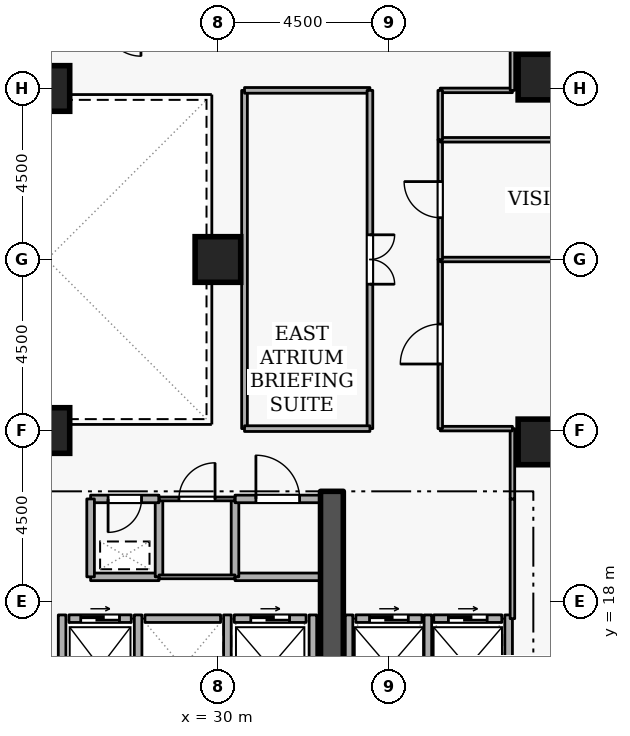
"""IFC4 building model, lengths in metres.
Left out: names, types, materials, properties, quantities, classifications, styles, units other than length and angle.
Written with IfcOpenShell. Run it as: python <this file> out.ifc"""

import sys

from ifc_helpers import new_model, si_unit, direction, frame, frame_2d, origin, origin_2d, place, context, subcontext, project, spatial, rectangle, extrude, element, fill, save


model = new_model("IFC4")
c1 = context("Model", 3, precision=1e-05, world=origin(), true_north=direction((0.0, 1.0)))
c2 = subcontext(c1, "Body", "Model", "MODEL_VIEW")
j1 = project(units=[si_unit("LENGTHUNIT", "METRE"), si_unit("PLANEANGLEUNIT", "RADIAN")], contexts=[c1])
p1 = place(None, origin())
s1 = spatial("IfcSite", under=j1, at=p1, CompositionType="ELEMENT")
p2 = place(p1, origin())
s2 = spatial("IfcBuilding", under=s1, at=p2, CompositionType="ELEMENT")
p3 = place(p2, frame((0.0, 0.0, 90.9)))
s3 = spatial("IfcBuildingStorey", under=s2, at=p3, CompositionType="ELEMENT", Elevation=90.9)
p4 = place(p3, frame((33.0, 15.2, 0.0), z_axis=(0.0, 0.0, 1.0), x_axis=(0.0, 1.0, 0.0)))
e1 = element("IfcWall", 1, at=p4, inside=s3, PredefinedType="SHEAR", context=c2, shape_type="SweptSolid", body=[
    extrude(rectangle(XDim=5.7, YDim=0.6, at=frame_2d((2.85, 0.0))), origin(), (0.0, 0.0, 1.0), 3.6),
])
for number, where, z_axis, x_axis in (
    (2, (38.5, 22.2, 0.0), (0.0, 0.0, 1.0), (1.0, 0.0, 0.0)),
    (3, (38.5, 31.8, 0.0), (0.0, 0.0, 1.0), (1.0, 0.0, 0.0)),
    (4, (25.5, 22.5, 0.0), (0.0, 0.0, 1.0), (1.0, 0.0, 0.0)),
    (5, (25.5, 31.5, 0.0), (0.0, 0.0, 1.0), (1.0, 0.0, 0.0)),
    (6, (30.0, 27.0, 0.0), (0.0, 0.0, 1.0), (1.0, 0.0, 0.0)),
):
    element("IfcColumn", number, at=place(p3, frame(where, z_axis=z_axis, x_axis=x_axis)), inside=s3, PredefinedType="COLUMN", context=c2, shape_type="SweptSolid", body=[
        extrude(rectangle(XDim=1.2, YDim=1.2, at=origin_2d()), origin(), (0.0, 0.0, 1.0), 3.6),
    ])
p5 = place(p3, frame((26.08, 17.55, 0.0), z_axis=(0.0, 0.0, 1.0), x_axis=(1.0, 0.0, 0.0)))
e7 = element("IfcWall", 7, at=p5, inside=s3, PredefinedType="STANDARD", context=c2, shape_type="SweptSolid", body=[
    extrude(rectangle(XDim=1.64, YDim=0.2, at=frame_2d((0.82, 0.0))), origin(), (0.0, 0.0, 1.0), 3.34),
])
p6 = place(p5, frame((0.31, 0.0, 0.0)))
e8 = element("IfcOpeningElement", 8, at=p6, cuts=e7, PredefinedType="OPENING", context=c2, shape_type="SweptSolid", body=[
    extrude(rectangle(XDim=1.02, YDim=2.06, at=frame_2d((0.51, 1.03))), frame((0.0, 0.11, 0.0), z_axis=(0.0, -1.0, 0.0), x_axis=(1.0, 0.0, 0.0)), (0.0, 0.0, 1.0), 0.22),
])
p7 = place(p3, frame((28.08, 17.55, 0.0), z_axis=(0.0, 0.0, 1.0), x_axis=(1.0, 0.0, 0.0)))
e9 = element("IfcWall", 9, at=p7, inside=s3, PredefinedType="STANDARD", context=c2, shape_type="SweptSolid", body=[
    extrude(rectangle(XDim=1.99, YDim=0.2, at=frame_2d((0.995, 0.0))), origin(), (0.0, 0.0, 1.0), 3.34),
])
p8 = place(p3, frame((30.43, 17.55, 0.0), z_axis=(0.0, 0.0, 1.0), x_axis=(1.0, 0.0, 0.0)))
e10 = element("IfcWall", 10, at=p8, inside=s3, PredefinedType="STANDARD", context=c2, shape_type="SweptSolid", body=[
    extrude(rectangle(XDim=1.89, YDim=0.2, at=frame_2d((0.945, 0.0))), origin(), (0.0, 0.0, 1.0), 3.34),
])
p9 = place(p8, frame((0.435, 0.0, 0.0)))
e11 = element("IfcOpeningElement", 11, at=p9, cuts=e10, PredefinedType="OPENING", context=c2, shape_type="SweptSolid", body=[
    extrude(rectangle(XDim=1.02, YDim=2.06, at=frame_2d((0.51, 1.03))), frame((0.0, 0.11, 0.0), z_axis=(0.0, -1.0, 0.0), x_axis=(1.0, 0.0, 0.0)), (0.0, 0.0, 1.0), 0.22),
])
p10 = place(p3, frame((33.63, 17.55, 0.0), z_axis=(0.0, 0.0, 1.0), x_axis=(1.0, 0.0, 0.0)))
e12 = element("IfcWall", 12, at=p10, inside=s3, PredefinedType="STANDARD", context=c2, shape_type="SweptSolid", body=[
    extrude(rectangle(XDim=1.74, YDim=0.2, at=frame_2d((0.87, 0.0))), origin(), (0.0, 0.0, 1.0), 3.34),
])
p11 = place(p10, frame((0.36, 0.0, 0.0)))
e13 = element("IfcOpeningElement", 13, at=p11, cuts=e12, PredefinedType="OPENING", context=c2, shape_type="SweptSolid", body=[
    extrude(rectangle(XDim=1.02, YDim=2.06, at=frame_2d((0.51, 1.03))), frame((0.0, 0.11, 0.0), z_axis=(0.0, -1.0, 0.0), x_axis=(1.0, 0.0, 0.0)), (0.0, 0.0, 1.0), 0.22),
])
p12 = place(p3, frame((35.68, 17.55, 0.0), z_axis=(0.0, 0.0, 1.0), x_axis=(1.0, 0.0, 0.0)))
e14 = element("IfcWall", 14, at=p12, inside=s3, PredefinedType="STANDARD", context=c2, shape_type="SweptSolid", body=[
    extrude(rectangle(XDim=1.79, YDim=0.2, at=frame_2d((0.895, 0.0))), origin(), (0.0, 0.0, 1.0), 3.34),
])
p13 = place(p12, frame((0.385, 0.0, 0.0)))
e15 = element("IfcOpeningElement", 15, at=p13, cuts=e14, PredefinedType="OPENING", context=c2, shape_type="SweptSolid", body=[
    extrude(rectangle(XDim=1.02, YDim=2.06, at=frame_2d((0.51, 1.03))), frame((0.0, 0.11, 0.0), z_axis=(0.0, -1.0, 0.0), x_axis=(1.0, 0.0, 0.0)), (0.0, 0.0, 1.0), 0.22),
])
for number, where, z_axis, x_axis in (
    (16, (27.9, 15.212, 0.0), (0.0, 0.0, 1.0), (0.0, 1.0, 0.0)),
    (17, (25.9, 15.212, 0.0), (0.0, 0.0, 1.0), (0.0, 1.0, 0.0)),
    (18, (30.25, 15.212, 0.0), (0.0, 0.0, 1.0), (0.0, 1.0, 0.0)),
    (19, (32.5, 15.212, 0.0), (0.0, 0.0, 1.0), (0.0, 1.0, 0.0)),
):
    element("IfcWall", number, at=place(p3, frame(where, z_axis=z_axis, x_axis=x_axis)), inside=s3, PredefinedType="STANDARD", context=c2, shape_type="SweptSolid", body=[
        extrude(rectangle(XDim=2.436, YDim=0.2, at=frame_2d((1.218, 0.0))), origin(), (0.0, 0.0, 1.0), 3.34),
    ])
for number, where, z_axis, x_axis in (
    (20, (35.525, 15.012, 0.0), (0.0, 0.0, 1.0), (0.0, 1.0, 0.0)),
    (21, (33.45, 15.012, 0.0), (0.0, 0.0, 1.0), (0.0, 1.0, 0.0)),
    (22, (37.65, 15.012, 0.0), (0.0, 0.0, 1.0), (0.0, 1.0, 0.0)),
):
    element("IfcWall", number, at=place(p3, frame(where, z_axis=z_axis, x_axis=x_axis)), inside=s3, PredefinedType="STANDARD", context=c2, shape_type="SweptSolid", body=[
        extrude(rectangle(XDim=2.636, YDim=0.2, at=frame_2d((1.318, 0.0))), origin(), (0.0, 0.0, 1.0), 3.34),
    ])
p14 = place(p3, frame((26.65, 18.65, 0.0), z_axis=(0.0, 0.0, 1.0), x_axis=(1.0, 0.0, 0.0)))
e23 = element("IfcWall", 23, at=p14, inside=s3, PredefinedType="STANDARD", context=c2, shape_type="SweptSolid", body=[
    extrude(rectangle(XDim=1.8, YDim=0.2, at=frame_2d((0.9, 0.0))), origin(), (0.0, 0.0, 1.0), 3.34),
])
p15 = place(p3, frame((28.45, 18.65, 0.0), z_axis=(0.0, 0.0, 1.0), x_axis=(0.0, 1.0, 0.0)))
e24 = element("IfcWall", 24, at=p15, inside=s3, PredefinedType="STANDARD", context=c2, shape_type="SweptSolid", body=[
    extrude(rectangle(XDim=2.05, YDim=0.2, at=frame_2d((1.025, 0.0))), origin(), (0.0, 0.0, 1.0), 3.34),
])
p16 = place(p3, frame((28.45, 20.7, 0.0), z_axis=(0.0, 0.0, 1.0), x_axis=(-1.0, 0.0, 0.0)))
e25 = element("IfcWall", 25, at=p16, inside=s3, PredefinedType="STANDARD", context=c2, shape_type="SweptSolid", body=[
    extrude(rectangle(XDim=1.8, YDim=0.2, at=frame_2d((0.9, 0.0))), origin(), (0.0, 0.0, 1.0), 3.34),
])
p17 = place(p16, frame((0.46, 0.0, 0.0)))
e26 = element("IfcOpeningElement", 26, at=p17, cuts=e25, PredefinedType="OPENING", context=c2, shape_type="SweptSolid", body=[
    extrude(rectangle(XDim=0.88, YDim=2.04, at=frame_2d((0.44, 1.02))), frame((0.0, 0.11, 0.0), z_axis=(0.0, -1.0, 0.0), x_axis=(1.0, 0.0, 0.0)), (0.0, 0.0, 1.0), 0.22),
])
p18 = place(p3, frame((26.65, 20.7, 0.0), z_axis=(0.0, 0.0, 1.0), x_axis=(0.0, -1.0, 0.0)))
e27 = element("IfcWall", 27, at=p18, inside=s3, PredefinedType="STANDARD", context=c2, shape_type="SweptSolid", body=[
    extrude(rectangle(XDim=2.05, YDim=0.2, at=frame_2d((1.025, 0.0))), origin(), (0.0, 0.0, 1.0), 3.34),
])
p19 = place(p3, frame((32.7, 18.65, 0.0), z_axis=(0.0, 0.0, 1.0), x_axis=(-1.0, 0.0, 0.0)))
e28 = element("IfcWall", 28, at=p19, inside=s3, PredefinedType="STANDARD", context=c2, shape_type="SweptSolid", body=[
    extrude(rectangle(XDim=2.25, YDim=0.2, at=frame_2d((1.125, 0.0))), origin(), (0.0, 0.0, 1.0), 3.34),
])
p20 = place(p3, frame((30.45, 18.65, 0.0), z_axis=(0.0, 0.0, 1.0), x_axis=(0.0, 1.0, 0.0)))
e29 = element("IfcWall", 29, at=p20, inside=s3, PredefinedType="STANDARD", context=c2, shape_type="SweptSolid", body=[
    extrude(rectangle(XDim=2.05, YDim=0.2, at=frame_2d((1.025, 0.0))), origin(), (0.0, 0.0, 1.0), 3.34),
])
p21 = place(p3, frame((30.45, 20.7, 0.0), z_axis=(0.0, 0.0, 1.0), x_axis=(1.0, 0.0, 0.0)))
e30 = element("IfcWall", 30, at=p21, inside=s3, PredefinedType="STANDARD", context=c2, shape_type="SweptSolid", body=[
    extrude(rectangle(XDim=2.25, YDim=0.2, at=frame_2d((1.125, 0.0))), origin(), (0.0, 0.0, 1.0), 3.34),
])
p22 = place(p21, frame((0.55, 0.0, 0.0)))
e31 = element("IfcOpeningElement", 31, at=p22, cuts=e30, PredefinedType="OPENING", context=c2, shape_type="SweptSolid", body=[
    extrude(rectangle(XDim=1.15, YDim=2.1, at=frame_2d((0.575, 1.05))), frame((0.0, 0.11, 0.0), z_axis=(0.0, -1.0, 0.0), x_axis=(1.0, 0.0, 0.0)), (0.0, 0.0, 1.0), 0.22),
])
p23 = place(p3, frame((30.45, 18.65, 0.0), z_axis=(0.0, 0.0, 1.0), x_axis=(-1.0, 0.0, 0.0)))
e32 = element("IfcWall", 32, at=p23, inside=s3, PredefinedType="PARTITIONING", context=c2, shape_type="SweptSolid", body=[
    extrude(rectangle(XDim=2.0, YDim=0.1, at=frame_2d((1.0, 0.0))), origin(), (0.0, 0.0, 1.0), 3.34),
])
p24 = place(p3, frame((28.45, 20.7, 0.0), z_axis=(0.0, 0.0, 1.0), x_axis=(1.0, 0.0, 0.0)))
e33 = element("IfcWall", 33, at=p24, inside=s3, PredefinedType="PARTITIONING", context=c2, shape_type="SweptSolid", body=[
    extrude(rectangle(XDim=2.0, YDim=0.1, at=frame_2d((1.0, 0.0))), origin(), (0.0, 0.0, 1.0), 3.34),
])
p25 = place(p24, frame((0.525, 0.0, 0.0)))
e34 = element("IfcOpeningElement", 34, at=p25, cuts=e33, PredefinedType="OPENING", context=c2, shape_type="SweptSolid", body=[
    extrude(rectangle(XDim=0.95, YDim=2.1, at=frame_2d((0.475, 1.05))), frame((0.0, 0.06, 0.0), z_axis=(0.0, -1.0, 0.0), x_axis=(1.0, 0.0, 0.0)), (0.0, 0.0, 1.0), 0.12),
])
p26 = place(p3, frame((37.75, 17.55, 0.0), z_axis=(0.0, 0.0, 1.0), x_axis=(0.0, 1.0, 0.0)))
e35 = element("IfcWall", 35, at=p26, inside=s3, PredefinedType="PARTITIONING", context=c2, shape_type="SweptSolid", body=[
    extrude(rectangle(XDim=3.15, YDim=0.12, at=frame_2d((1.575, 0.0))), origin(), (0.0, 0.0, 1.0), 3.34),
])
p27 = place(p3, frame((37.75, 20.7, 0.0), z_axis=(0.0, 0.0, 1.0), x_axis=(0.0, 1.0, 0.0)))
e36 = element("IfcWall", 36, at=p27, inside=s3, PredefinedType="PARTITIONING", context=c2, shape_type="SweptSolid", body=[
    extrude(rectangle(XDim=1.85, YDim=0.12, at=frame_2d((0.925, 0.0))), origin(), (0.0, 0.0, 1.0), 3.34),
])
p28 = place(p3, frame((37.75, 22.55, 0.0), z_axis=(0.0, 0.0, 1.0), x_axis=(-1.0, 0.0, 0.0)))
e37 = element("IfcWall", 37, at=p28, inside=s3, PredefinedType="PARTITIONING", context=c2, shape_type="SweptSolid", body=[
    extrude(rectangle(XDim=1.9, YDim=0.12, at=frame_2d((0.95, 0.0))), origin(), (0.0, 0.0, 1.0), 3.34),
])
p29 = place(p3, frame((35.85, 22.55, 0.0), z_axis=(0.0, 0.0, 1.0), x_axis=(0.0, 1.0, 0.0)))
e38 = element("IfcWall", 38, at=p29, inside=s3, PredefinedType="PARTITIONING", context=c2, shape_type="SweptSolid", body=[
    extrude(rectangle(XDim=4.45, YDim=0.12, at=frame_2d((2.225, 0.0))), origin(), (0.0, 0.0, 1.0), 3.34),
])
p30 = place(p29, frame((1.7, 0.0, 0.0)))
e39 = element("IfcOpeningElement", 39, at=p30, cuts=e38, PredefinedType="OPENING", context=c2, shape_type="SweptSolid", body=[
    extrude(rectangle(XDim=1.05, YDim=2.1, at=frame_2d((0.525, 1.05))), frame((0.0, 0.07, 0.0), z_axis=(0.0, -1.0, 0.0), x_axis=(1.0, 0.0, 0.0)), (0.0, 0.0, 1.0), 0.14),
])
p31 = place(p3, frame((35.85, 27.0, 0.0), z_axis=(0.0, 0.0, 1.0), x_axis=(1.0, 0.0, 0.0)))
e40 = element("IfcWall", 40, at=p31, inside=s3, PredefinedType="PARTITIONING", context=c2, shape_type="SweptSolid", body=[
    extrude(rectangle(XDim=13.57, YDim=0.12, at=frame_2d((6.785, 0.0))), origin(), (0.0, 0.0, 1.0), 2.932),
])
p32 = place(p3, frame((35.85, 27.0, 0.0), z_axis=(0.0, 0.0, 1.0), x_axis=(0.0, 1.0, 0.0)))
e41 = element("IfcWall", 41, at=p32, inside=s3, PredefinedType="PARTITIONING", context=c2, shape_type="SweptSolid", body=[
    extrude(rectangle(XDim=3.15, YDim=0.12, at=frame_2d((1.575, 0.0))), origin(), (0.0, 0.0, 1.0), 3.34),
])
p33 = place(p32, frame((1.1, 0.0, 0.0)))
e42 = element("IfcOpeningElement", 42, at=p33, cuts=e41, PredefinedType="OPENING", context=c2, shape_type="SweptSolid", body=[
    extrude(rectangle(XDim=0.95, YDim=2.1, at=frame_2d((0.475, 1.05))), frame((0.0, 0.07, 0.0), z_axis=(0.0, -1.0, 0.0), x_axis=(1.0, 0.0, 0.0)), (0.0, 0.0, 1.0), 0.14),
])
p34 = place(p3, frame((35.85, 30.15, 0.0), z_axis=(0.0, 0.0, 1.0), x_axis=(1.0, 0.0, 0.0)))
e43 = element("IfcWall", 43, at=p34, inside=s3, PredefinedType="PARTITIONING", context=c2, shape_type="SweptSolid", body=[
    extrude(rectangle(XDim=13.57, YDim=0.12, at=frame_2d((6.785, 0.0))), origin(), (0.0, 0.0, 1.0), 3.34),
])
p35 = place(p3, frame((35.85, 31.45, 0.0), z_axis=(0.0, 0.0, 1.0), x_axis=(1.0, 0.0, 0.0)))
e44 = element("IfcWall", 44, at=p35, inside=s3, PredefinedType="PARTITIONING", context=c2, shape_type="SweptSolid", body=[
    extrude(rectangle(XDim=1.9, YDim=0.12, at=frame_2d((0.95, 0.0))), origin(), (0.0, 0.0, 1.0), 3.34),
])
p36 = place(p3, frame((37.75, 31.45, 0.0), z_axis=(0.0, 0.0, 1.0), x_axis=(0.0, 1.0, 0.0)))
e45 = element("IfcWall", 45, at=p36, inside=s3, PredefinedType="PARTITIONING", context=c2, shape_type="SweptSolid", body=[
    extrude(rectangle(XDim=1.85, YDim=0.12, at=frame_2d((0.925, 0.0))), origin(), (0.0, 0.0, 1.0), 3.34),
])
p37 = place(p3, frame((35.85, 30.15, 0.0), z_axis=(0.0, 0.0, 1.0), x_axis=(0.0, 1.0, 0.0)))
e46 = element("IfcWall", 46, at=p37, inside=s3, PredefinedType="PARTITIONING", context=c2, shape_type="SweptSolid", body=[
    extrude(rectangle(XDim=1.3, YDim=0.12, at=frame_2d((0.65, 0.0))), origin(), (0.0, 0.0, 1.0), 3.34),
])
p38 = place(p3, frame((30.7, 22.55, 0.0), z_axis=(0.0, 0.0, 1.0), x_axis=(0.0, 1.0, 0.0)))
e47 = element("IfcWall", 47, at=p38, inside=s3, PredefinedType="PARTITIONING", context=c2, shape_type="SweptSolid", body=[
    extrude(rectangle(XDim=8.9, YDim=0.15, at=frame_2d((4.45, 0.0))), origin(), (0.0, 0.0, 1.0), 3.34),
])
p39 = place(p3, frame((30.7, 31.45, 0.0), z_axis=(0.0, 0.0, 1.0), x_axis=(1.0, 0.0, 0.0)))
e48 = element("IfcWall", 48, at=p39, inside=s3, PredefinedType="PARTITIONING", context=c2, shape_type="SweptSolid", body=[
    extrude(rectangle(XDim=3.3, YDim=0.15, at=frame_2d((1.65, 0.0))), origin(), (0.0, 0.0, 1.0), 3.34),
])
p40 = place(p3, frame((34.0, 31.45, 0.0), z_axis=(0.0, 0.0, 1.0), x_axis=(0.0, -1.0, 0.0)))
e49 = element("IfcWall", 49, at=p40, inside=s3, PredefinedType="PARTITIONING", context=c2, shape_type="SweptSolid", body=[
    extrude(rectangle(XDim=8.9, YDim=0.15, at=frame_2d((4.45, 0.0))), origin(), (0.0, 0.0, 1.0), 3.34),
])
p41 = place(p40, frame((3.8, 0.0, 0.0)))
e50 = element("IfcOpeningElement", 50, at=p41, cuts=e49, PredefinedType="OPENING", context=c2, shape_type="SweptSolid", body=[
    extrude(rectangle(XDim=1.3, YDim=2.12, at=frame_2d((0.65, 1.06))), frame((0.0, 0.085, 0.0), z_axis=(0.0, -1.0, 0.0), x_axis=(1.0, 0.0, 0.0)), (0.0, 0.0, 1.0), 0.17),
])
p42 = place(p3, frame((34.0, 22.55, 0.0), z_axis=(0.0, 0.0, 1.0), x_axis=(-1.0, 0.0, 0.0)))
e51 = element("IfcWall", 51, at=p42, inside=s3, PredefinedType="PARTITIONING", context=c2, shape_type="SweptSolid", body=[
    extrude(rectangle(XDim=3.3, YDim=0.15, at=frame_2d((1.65, 0.0))), origin(), (0.0, 0.0, 1.0), 3.34),
])
p43 = place(p6, origin())
e52 = element("IfcDoor", 52, at=p43, inside=s3, OperationType="SLIDING_TO_LEFT", PredefinedType="DOOR", context=c2, shape_type="SweptSolid", body=[
    extrude(rectangle(XDim=1.02, YDim=2.06, at=frame_2d((0.51, 1.03))), frame((0.0, 0.025, 0.0), z_axis=(0.0, -1.0, 0.0), x_axis=(1.0, 0.0, 0.0)), (0.0, 0.0, 1.0), 0.05),
])
fill(e8, e52)
p44 = place(p9, origin())
e53 = element("IfcDoor", 53, at=p44, inside=s3, OperationType="SLIDING_TO_LEFT", PredefinedType="DOOR", context=c2, shape_type="SweptSolid", body=[
    extrude(rectangle(XDim=1.02, YDim=2.06, at=frame_2d((0.51, 1.03))), frame((0.0, 0.025, 0.0), z_axis=(0.0, -1.0, 0.0), x_axis=(1.0, 0.0, 0.0)), (0.0, 0.0, 1.0), 0.05),
])
fill(e11, e53)
p45 = place(p11, origin())
e54 = element("IfcDoor", 54, at=p45, inside=s3, OperationType="SLIDING_TO_LEFT", PredefinedType="DOOR", context=c2, shape_type="SweptSolid", body=[
    extrude(rectangle(XDim=1.02, YDim=2.06, at=frame_2d((0.51, 1.03))), frame((0.0, 0.025, 0.0), z_axis=(0.0, -1.0, 0.0), x_axis=(1.0, 0.0, 0.0)), (0.0, 0.0, 1.0), 0.05),
])
fill(e13, e54)
p46 = place(p13, origin())
e55 = element("IfcDoor", 55, at=p46, inside=s3, OperationType="SLIDING_TO_LEFT", PredefinedType="DOOR", context=c2, shape_type="SweptSolid", body=[
    extrude(rectangle(XDim=1.02, YDim=2.06, at=frame_2d((0.51, 1.03))), frame((0.0, 0.025, 0.0), z_axis=(0.0, -1.0, 0.0), x_axis=(1.0, 0.0, 0.0)), (0.0, 0.0, 1.0), 0.05),
])
fill(e15, e55)
p47 = place(p17, origin())
e56 = element("IfcDoor", 56, at=p47, inside=s3, OperationType="SINGLE_SWING_RIGHT", PredefinedType="DOOR", context=c2, shape_type="SweptSolid", body=[
    extrude(rectangle(XDim=0.88, YDim=2.04, at=frame_2d((0.44, 1.02))), frame((0.0, 0.025, 0.0), z_axis=(0.0, -1.0, 0.0), x_axis=(1.0, 0.0, 0.0)), (0.0, 0.0, 1.0), 0.05),
])
fill(e26, e56)
p48 = place(p25, origin())
e57 = element("IfcDoor", 57, at=p48, inside=s3, OperationType="SINGLE_SWING_RIGHT", PredefinedType="DOOR", context=c2, shape_type="SweptSolid", body=[
    extrude(rectangle(XDim=0.95, YDim=2.1, at=frame_2d((0.475, 1.05))), frame((0.0, 0.025, 0.0), z_axis=(0.0, -1.0, 0.0), x_axis=(1.0, 0.0, 0.0)), (0.0, 0.0, 1.0), 0.05),
])
fill(e34, e57)
p49 = place(p22, origin())
e58 = element("IfcDoor", 58, at=p49, inside=s3, OperationType="SINGLE_SWING_LEFT", PredefinedType="DOOR", context=c2, shape_type="SweptSolid", body=[
    extrude(rectangle(XDim=1.15, YDim=2.1, at=frame_2d((0.575, 1.05))), frame((0.0, 0.025, 0.0), z_axis=(0.0, -1.0, 0.0), x_axis=(1.0, 0.0, 0.0)), (0.0, 0.0, 1.0), 0.05),
])
fill(e31, e58)
p50 = place(p30, origin())
e59 = element("IfcDoor", 59, at=p50, inside=s3, OperationType="SINGLE_SWING_LEFT", PredefinedType="DOOR", context=c2, shape_type="SweptSolid", body=[
    extrude(rectangle(XDim=1.05, YDim=2.1, at=frame_2d((0.525, 1.05))), frame((0.0, 0.025, 0.0), z_axis=(0.0, -1.0, 0.0), x_axis=(1.0, 0.0, 0.0)), (0.0, 0.0, 1.0), 0.05),
])
fill(e39, e59)
p51 = place(p33, origin())
e60 = element("IfcDoor", 60, at=p51, inside=s3, OperationType="SINGLE_SWING_RIGHT", PredefinedType="DOOR", context=c2, shape_type="SweptSolid", body=[
    extrude(rectangle(XDim=0.95, YDim=2.1, at=frame_2d((0.475, 1.05))), frame((0.0, 0.025, 0.0), z_axis=(0.0, -1.0, 0.0), x_axis=(1.0, 0.0, 0.0)), (0.0, 0.0, 1.0), 0.05),
])
fill(e42, e60)
p52 = place(p41, origin())
e61 = element("IfcDoor", 61, at=p52, inside=s3, OperationType="DOUBLE_DOOR_SINGLE_SWING", PredefinedType="DOOR", context=c2, shape_type="SweptSolid", body=[
    extrude(rectangle(XDim=1.3, YDim=2.12, at=frame_2d((0.65, 1.06))), frame((0.0, 0.025, 0.0), z_axis=(0.0, -1.0, 0.0), x_axis=(1.0, 0.0, 0.0)), (0.0, 0.0, 1.0), 0.05),
])
fill(e50, e61)
save(model, sys.argv[1])
